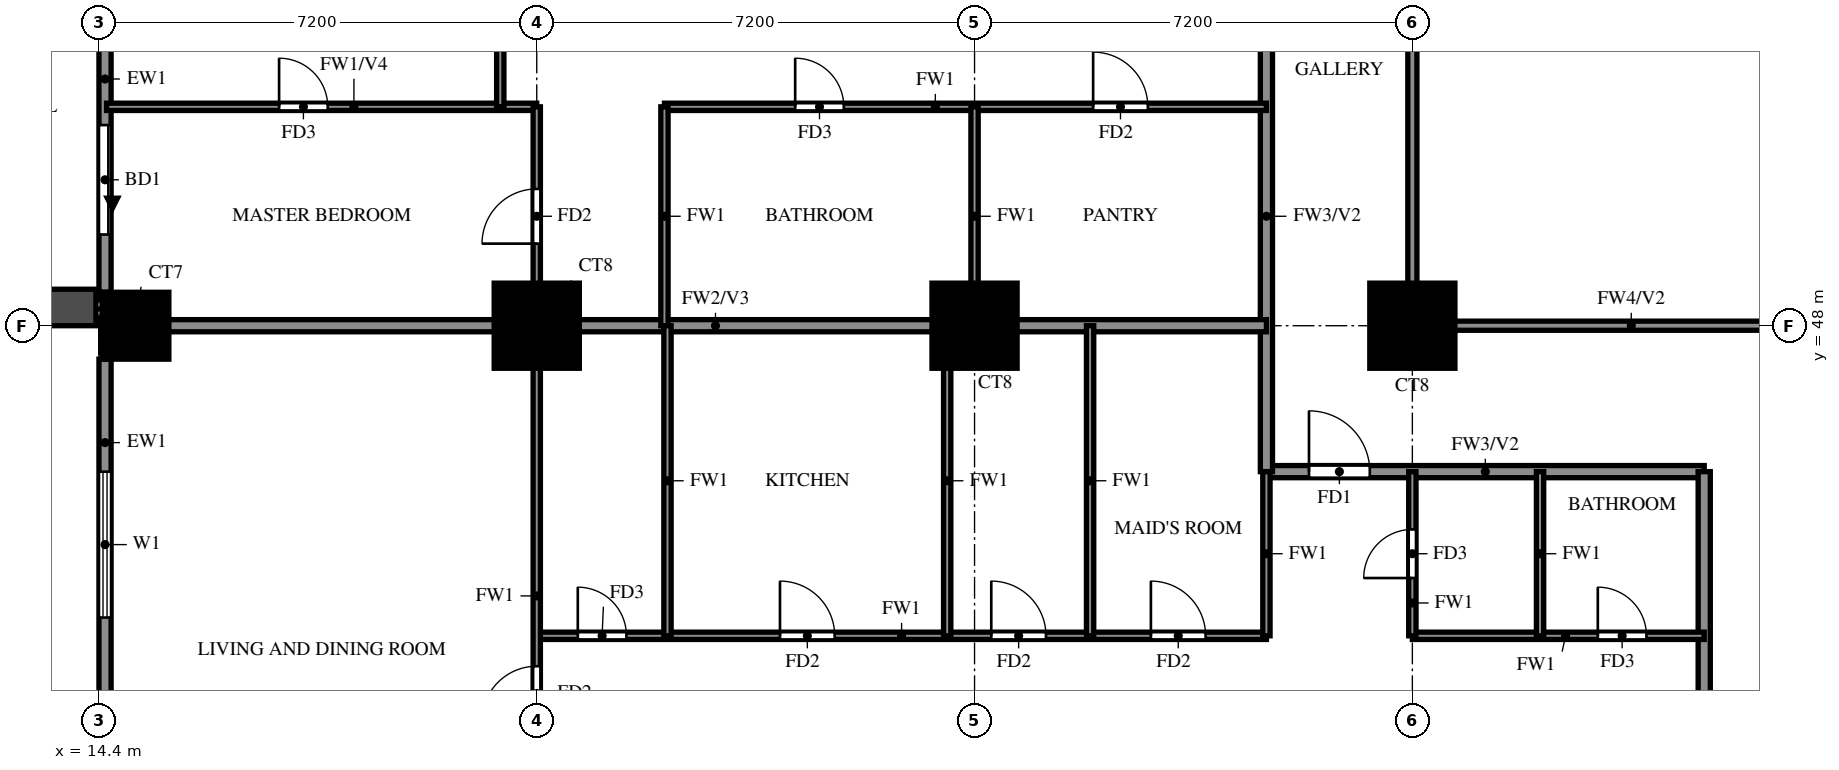
"""IFC4 building model, lengths in metres.
Left out: names, types, materials, properties, quantities, classifications, styles, units other than length and angle.
Written with IfcOpenShell. Run it as: python <this file> out.ifc"""

import sys

from ifc_helpers import new_model, si_unit, direction, frame, frame_2d, origin, origin_2d, place, context, subcontext, project, spatial, rectangle, extrude, source, transform, mapped, element, fill, save


model = new_model("IFC4")
c1 = context("Model", 3, precision=1e-05, world=origin(), true_north=direction((0.0, 1.0)))
c2 = subcontext(c1, "Body", "Model", "MODEL_VIEW")
j1 = project(units=[si_unit("LENGTHUNIT", "METRE"), si_unit("PLANEANGLEUNIT", "RADIAN")], contexts=[c1])
p1 = place(None, origin())
s1 = spatial("IfcSite", under=j1, at=p1, CompositionType="ELEMENT")
p2 = place(p1, origin())
s2 = spatial("IfcBuilding", under=s1, at=p2, CompositionType="ELEMENT")
p3 = place(p2, frame((0.0, 0.0, 58.5)))
s3 = spatial("IfcBuildingStorey", under=s2, at=p3, CompositionType="ELEMENT", Elevation=58.5)
m1 = source(origin(), c2, "Body", "SweptSolid", [
    extrude(rectangle(XDim=1.1, YDim=1.1, at=origin_2d()), origin(), (0.0, 0.0, 1.0), 3.18),
])
p4 = place(p3, frame((15.0, 48.0, 0.0), z_axis=(0.0, 0.0, 1.0), x_axis=(1.0, 0.0, 0.0)))
e1 = element("IfcColumn", 1, at=p4, inside=s3, PredefinedType="COLUMN", context=c2, shape_type="MappedRepresentation", body=[
    mapped(m1, transform((0.0, 0.0, 0.0))),
])
m2 = source(origin(), c2, "Body", "SweptSolid", [
    extrude(rectangle(XDim=1.4, YDim=1.4, at=origin_2d()), origin(), (0.0, 0.0, 1.0), 3.18),
])
for number, where, z_axis, x_axis in (
    (2, (21.6, 48.0, 0.0), (0.0, 0.0, 1.0), (1.0, 0.0, 0.0)),
    (3, (28.8, 48.0, 0.0), (0.0, 0.0, 1.0), (1.0, 0.0, 0.0)),
    (4, (36.0, 48.0, 0.0), (0.0, 0.0, 1.0), (1.0, 0.0, 0.0)),
):
    element("IfcColumn", number, at=place(p3, frame(where, z_axis=z_axis, x_axis=x_axis)), inside=s3, PredefinedType="COLUMN", context=c2, shape_type="MappedRepresentation", body=[
        mapped(m2, transform((0.0, 0.0, 0.0))),
    ])
p5 = place(p3, frame((14.5, 54.65, 0.0), z_axis=(0.0, 0.0, 1.0), x_axis=(0.0, -1.0, 0.0)))
e5 = element("IfcWall", 5, at=p5, inside=s3, PredefinedType="SOLIDWALL", context=c2, shape_type="SweptSolid", body=[
    extrude(rectangle(XDim=6.1, YDim=0.2, at=frame_2d((3.05, 0.0))), origin(), (0.0, 0.0, 1.0), 3.18),
])
p6 = place(p5, frame((3.35, 0.0, 0.0)))
e6 = element("IfcOpeningElement", 6, at=p6, cuts=e5, PredefinedType="OPENING", context=c2, shape_type="SweptSolid", body=[
    extrude(rectangle(XDim=1.8, YDim=2.4, at=frame_2d((0.9, 1.2))), frame((0.0, 0.11, 0.0), z_axis=(0.0, -1.0, 0.0), x_axis=(1.0, 0.0, 0.0)), (0.0, 0.0, 1.0), 0.22),
])
p7 = place(p5, frame((1.175, 0.0, 1.5)))
e7 = element("IfcOpeningElement", 7, at=p7, cuts=e5, PredefinedType="OPENING", context=c2, shape_type="SweptSolid", body=[
    extrude(rectangle(XDim=0.9, YDim=0.9, at=frame_2d((0.45, 0.45))), frame((0.0, 0.11, 0.0), z_axis=(0.0, -1.0, 0.0), x_axis=(1.0, 0.0, 0.0)), (0.0, 0.0, 1.0), 0.22),
])
p8 = place(p3, frame((14.5, 47.45, 0.0), z_axis=(0.0, 0.0, 1.0), x_axis=(0.0, -1.0, 0.0)))
e8 = element("IfcWall", 8, at=p8, inside=s3, PredefinedType="SOLIDWALL", context=c2, shape_type="SweptSolid", body=[
    extrude(rectangle(XDim=6.1, YDim=0.2, at=frame_2d((3.05, 0.0))), origin(), (0.0, 0.0, 1.0), 3.18),
])
p9 = place(p8, frame((1.85, 0.0, 0.6)))
e9 = element("IfcOpeningElement", 9, at=p9, cuts=e8, PredefinedType="OPENING", context=c2, shape_type="SweptSolid", body=[
    extrude(rectangle(XDim=2.4, YDim=2.4, at=frame_2d((1.2, 1.2))), frame((0.0, 0.11, 0.0), z_axis=(0.0, -1.0, 0.0), x_axis=(1.0, 0.0, 0.0)), (0.0, 0.0, 1.0), 0.22),
])
p10 = place(p3, frame((14.35, 48.3, 0.0), z_axis=(0.0, 0.0, 1.0), x_axis=(-1.0, 0.0, 0.0)))
e10 = element("IfcWall", 10, at=p10, inside=s3, PredefinedType="SOLIDWALL", context=c2, shape_type="SweptSolid", body=[
    extrude(rectangle(XDim=2.65, YDim=0.6, at=frame_2d((1.325, 0.0))), origin(), (0.0, 0.0, 1.0), 2.85),
])
p11 = place(p3, frame((33.6, 45.6, 0.0), z_axis=(0.0, 0.0, 1.0), x_axis=(1.0, 0.0, 0.0)))
e11 = element("IfcWall", 11, at=p11, inside=s3, PredefinedType="SOLIDWALL", context=c2, shape_type="SweptSolid", body=[
    extrude(rectangle(XDim=7.2, YDim=0.2, at=frame_2d((3.6, 0.0))), origin(), (0.0, 0.0, 1.0), 3.18),
])
p12 = place(p11, frame((0.7, 0.0, 0.0)))
e12 = element("IfcOpeningElement", 12, at=p12, cuts=e11, PredefinedType="OPENING", context=c2, shape_type="SweptSolid", body=[
    extrude(rectangle(XDim=1.0, YDim=2.1, at=frame_2d((0.5, 1.05))), frame((0.0, 0.11, 0.0), z_axis=(0.0, -1.0, 0.0), x_axis=(1.0, 0.0, 0.0)), (0.0, 0.0, 1.0), 0.22),
])
p13 = place(p3, frame((33.6, 45.6, 0.0), z_axis=(0.0, 0.0, 1.0), x_axis=(0.0, 1.0, 0.0)))
e13 = element("IfcWall", 13, at=p13, inside=s3, PredefinedType="SOLIDWALL", context=c2, shape_type="SweptSolid", body=[
    extrude(rectangle(XDim=8.4, YDim=0.2, at=frame_2d((4.2, 0.0))), origin(), (0.0, 0.0, 1.0), 3.18),
])
p14 = place(p3, frame((40.8, 33.725, 0.0), z_axis=(0.0, 0.0, 1.0), x_axis=(0.0, 1.0, 0.0)))
e14 = element("IfcWall", 14, at=p14, inside=s3, PredefinedType="SOLIDWALL", context=c2, shape_type="SweptSolid", body=[
    extrude(rectangle(XDim=11.875, YDim=0.2, at=frame_2d((5.938, 0.0))), origin(), (0.0, 0.0, 1.0), 2.28),
])
p15 = place(p3, frame((14.525, 48.0, 0.0), z_axis=(0.0, 0.0, 1.0), x_axis=(1.0, 0.0, 0.0)))
e15 = element("IfcWall", 15, at=p15, inside=s3, PredefinedType="SOLIDWALL", context=c2, shape_type="SweptSolid", body=[
    extrude(rectangle(XDim=19.075, YDim=0.2, at=frame_2d((9.538, 0.0))), origin(), (0.0, 0.0, 1.0), 3.18),
])
p16 = place(p3, frame((21.6, 42.9, 0.0), z_axis=(0.0, 0.0, 1.0), x_axis=(1.0, 0.0, 0.0)))
e16 = element("IfcWall", 16, at=p16, inside=s3, PredefinedType="PARTITIONING", context=c2, shape_type="SweptSolid", body=[
    extrude(rectangle(XDim=12.0, YDim=0.12, at=frame_2d((6.0, 0.0))), origin(), (0.0, 0.0, 1.0), 3.18),
])
p17 = place(p16, frame((0.675, 0.0, 0.0)))
e17 = element("IfcOpeningElement", 17, at=p17, cuts=e16, PredefinedType="OPENING", context=c2, shape_type="SweptSolid", body=[
    extrude(rectangle(XDim=0.8, YDim=2.1, at=frame_2d((0.4, 1.05))), frame((0.0, 0.07, 0.0), z_axis=(0.0, -1.0, 0.0), x_axis=(1.0, 0.0, 0.0)), (0.0, 0.0, 1.0), 0.14),
])
p18 = place(p16, frame((4.0, 0.0, 0.0)))
e18 = element("IfcOpeningElement", 18, at=p18, cuts=e16, PredefinedType="OPENING", context=c2, shape_type="SweptSolid", body=[
    extrude(rectangle(XDim=0.9, YDim=2.1, at=frame_2d((0.45, 1.05))), frame((0.0, 0.07, 0.0), z_axis=(0.0, -1.0, 0.0), x_axis=(1.0, 0.0, 0.0)), (0.0, 0.0, 1.0), 0.14),
])
p19 = place(p16, frame((7.475, 0.0, 0.0)))
e19 = element("IfcOpeningElement", 19, at=p19, cuts=e16, PredefinedType="OPENING", context=c2, shape_type="SweptSolid", body=[
    extrude(rectangle(XDim=0.9, YDim=2.1, at=frame_2d((0.45, 1.05))), frame((0.0, 0.07, 0.0), z_axis=(0.0, -1.0, 0.0), x_axis=(1.0, 0.0, 0.0)), (0.0, 0.0, 1.0), 0.14),
])
p20 = place(p16, frame((10.1, 0.0, 0.0)))
e20 = element("IfcOpeningElement", 20, at=p20, cuts=e16, PredefinedType="OPENING", context=c2, shape_type="SweptSolid", body=[
    extrude(rectangle(XDim=0.9, YDim=2.1, at=frame_2d((0.45, 1.05))), frame((0.0, 0.07, 0.0), z_axis=(0.0, -1.0, 0.0), x_axis=(1.0, 0.0, 0.0)), (0.0, 0.0, 1.0), 0.14),
])
p21 = place(p3, frame((36.0, 42.9, 0.0), z_axis=(0.0, 0.0, 1.0), x_axis=(1.0, 0.0, 0.0)))
e21 = element("IfcWall", 21, at=p21, inside=s3, PredefinedType="PARTITIONING", context=c2, shape_type="SweptSolid", body=[
    extrude(rectangle(XDim=4.8, YDim=0.12, at=frame_2d((2.4, 0.0))), origin(), (0.0, 0.0, 1.0), 3.18),
])
p22 = place(p21, frame((3.05, 0.0, 0.0)))
e22 = element("IfcOpeningElement", 22, at=p22, cuts=e21, PredefinedType="OPENING", context=c2, shape_type="SweptSolid", body=[
    extrude(rectangle(XDim=0.8, YDim=2.1, at=frame_2d((0.4, 1.05))), frame((0.0, 0.07, 0.0), z_axis=(0.0, -1.0, 0.0), x_axis=(1.0, 0.0, 0.0)), (0.0, 0.0, 1.0), 0.14),
])
p23 = place(p3, frame((14.525, 51.6, 0.0), z_axis=(0.0, 0.0, 1.0), x_axis=(1.0, 0.0, 0.0)))
e23 = element("IfcWall", 23, at=p23, inside=s3, PredefinedType="PARTITIONING", context=c2, shape_type="SweptSolid", body=[
    extrude(rectangle(XDim=7.075, YDim=0.12, at=frame_2d((3.538, 0.0))), origin(), (0.0, 0.0, 1.0), 2.28),
])
p24 = place(p23, frame((2.837, 0.0, 0.0)))
e24 = element("IfcOpeningElement", 24, at=p24, cuts=e23, PredefinedType="OPENING", context=c2, shape_type="SweptSolid", body=[
    extrude(rectangle(XDim=0.8, YDim=2.1, at=frame_2d((0.4, 1.05))), frame((0.0, 0.07, 0.0), z_axis=(0.0, -1.0, 0.0), x_axis=(1.0, 0.0, 0.0)), (0.0, 0.0, 1.0), 0.14),
])
p25 = place(p3, frame((23.7, 51.6, 0.0), z_axis=(0.0, 0.0, 1.0), x_axis=(1.0, 0.0, 0.0)))
e25 = element("IfcWall", 25, at=p25, inside=s3, PredefinedType="PARTITIONING", context=c2, shape_type="SweptSolid", body=[
    extrude(rectangle(XDim=9.9, YDim=0.12, at=frame_2d((4.95, 0.0))), origin(), (0.0, 0.0, 1.0), 3.18),
])
p26 = place(p25, frame((2.15, 0.0, 0.0)))
e26 = element("IfcOpeningElement", 26, at=p26, cuts=e25, PredefinedType="OPENING", context=c2, shape_type="SweptSolid", body=[
    extrude(rectangle(XDim=0.8, YDim=2.1, at=frame_2d((0.4, 1.05))), frame((0.0, 0.07, 0.0), z_axis=(0.0, -1.0, 0.0), x_axis=(1.0, 0.0, 0.0)), (0.0, 0.0, 1.0), 0.14),
])
p27 = place(p25, frame((7.05, 0.0, 0.0)))
e27 = element("IfcOpeningElement", 27, at=p27, cuts=e25, PredefinedType="OPENING", context=c2, shape_type="SweptSolid", body=[
    extrude(rectangle(XDim=0.9, YDim=2.1, at=frame_2d((0.45, 1.05))), frame((0.0, 0.07, 0.0), z_axis=(0.0, -1.0, 0.0), x_axis=(1.0, 0.0, 0.0)), (0.0, 0.0, 1.0), 0.14),
])
p28 = place(p3, frame((21.0, 51.6, 0.0), z_axis=(0.0, 0.0, 1.0), x_axis=(0.0, 1.0, 0.0)))
e28 = element("IfcWall", 28, at=p28, inside=s3, PredefinedType="PARTITIONING", context=c2, shape_type="SweptSolid", body=[
    extrude(rectangle(XDim=3.6, YDim=0.12, at=frame_2d((1.8, 0.0))), origin(), (0.0, 0.0, 1.0), 3.18),
])
p29 = place(p3, frame((21.6, 33.725, 0.0), z_axis=(0.0, 0.0, 1.0), x_axis=(0.0, 1.0, 0.0)))
e29 = element("IfcWall", 29, at=p29, inside=s3, PredefinedType="PARTITIONING", context=c2, shape_type="SweptSolid", body=[
    extrude(rectangle(XDim=17.875, YDim=0.12, at=frame_2d((8.938, 0.0))), origin(), (0.0, 0.0, 1.0), 3.18),
])
p30 = place(p29, frame((7.775, 0.0, 0.0)))
e30 = element("IfcOpeningElement", 30, at=p30, cuts=e29, PredefinedType="OPENING", context=c2, shape_type="SweptSolid", body=[
    extrude(rectangle(XDim=0.9, YDim=2.1, at=frame_2d((0.45, 1.05))), frame((0.0, 0.07, 0.0), z_axis=(0.0, -1.0, 0.0), x_axis=(1.0, 0.0, 0.0)), (0.0, 0.0, 1.0), 0.14),
])
p31 = place(p29, frame((15.625, 0.0, 0.0)))
e31 = element("IfcOpeningElement", 31, at=p31, cuts=e29, PredefinedType="OPENING", context=c2, shape_type="SweptSolid", body=[
    extrude(rectangle(XDim=0.9, YDim=2.1, at=frame_2d((0.45, 1.05))), frame((0.0, 0.07, 0.0), z_axis=(0.0, -1.0, 0.0), x_axis=(1.0, 0.0, 0.0)), (0.0, 0.0, 1.0), 0.14),
])
p32 = place(p3, frame((23.7, 48.0, 0.0), z_axis=(0.0, 0.0, 1.0), x_axis=(0.0, 1.0, 0.0)))
e32 = element("IfcWall", 32, at=p32, inside=s3, PredefinedType="PARTITIONING", context=c2, shape_type="SweptSolid", body=[
    extrude(rectangle(XDim=3.6, YDim=0.12, at=frame_2d((1.8, 0.0))), origin(), (0.0, 0.0, 1.0), 3.18),
])
for number, where, z_axis, x_axis in (
    (33, (23.75, 42.9, 0.0), (0.0, 0.0, 1.0), (0.0, 1.0, 0.0)),
    (34, (28.35, 42.9, 0.0), (0.0, 0.0, 1.0), (0.0, 1.0, 0.0)),
):
    element("IfcWall", number, at=place(p3, frame(where, z_axis=z_axis, x_axis=x_axis)), inside=s3, PredefinedType="PARTITIONING", context=c2, shape_type="SweptSolid", body=[
        extrude(rectangle(XDim=5.1, YDim=0.12, at=frame_2d((2.55, 0.0))), origin(), (0.0, 0.0, 1.0), 3.18),
    ])
p33 = place(p3, frame((28.8, 48.0, 0.0), z_axis=(0.0, 0.0, 1.0), x_axis=(0.0, 1.0, 0.0)))
e35 = element("IfcWall", 35, at=p33, inside=s3, PredefinedType="PARTITIONING", context=c2, shape_type="SweptSolid", body=[
    extrude(rectangle(XDim=3.6, YDim=0.12, at=frame_2d((1.8, 0.0))), origin(), (0.0, 0.0, 1.0), 3.18),
])
p34 = place(p3, frame((30.7, 42.9, 0.0), z_axis=(0.0, 0.0, 1.0), x_axis=(0.0, 1.0, 0.0)))
e36 = element("IfcWall", 36, at=p34, inside=s3, PredefinedType="PARTITIONING", context=c2, shape_type="SweptSolid", body=[
    extrude(rectangle(XDim=5.1, YDim=0.12, at=frame_2d((2.55, 0.0))), origin(), (0.0, 0.0, 1.0), 3.18),
])
p35 = place(p3, frame((33.6, 42.9, 0.0), z_axis=(0.0, 0.0, 1.0), x_axis=(0.0, 1.0, 0.0)))
e37 = element("IfcWall", 37, at=p35, inside=s3, PredefinedType="PARTITIONING", context=c2, shape_type="SweptSolid", body=[
    extrude(rectangle(XDim=2.7, YDim=0.12, at=frame_2d((1.35, 0.0))), origin(), (0.0, 0.0, 1.0), 3.18),
])
p36 = place(p3, frame((36.0, 42.9, 0.0), z_axis=(0.0, 0.0, 1.0), x_axis=(0.0, 1.0, 0.0)))
e38 = element("IfcWall", 38, at=p36, inside=s3, PredefinedType="PARTITIONING", context=c2, shape_type="SweptSolid", body=[
    extrude(rectangle(XDim=2.7, YDim=0.12, at=frame_2d((1.35, 0.0))), origin(), (0.0, 0.0, 1.0), 3.18),
])
p37 = place(p36, frame((0.95, 0.0, 0.0)))
e39 = element("IfcOpeningElement", 39, at=p37, cuts=e38, PredefinedType="OPENING", context=c2, shape_type="SweptSolid", body=[
    extrude(rectangle(XDim=0.8, YDim=2.1, at=frame_2d((0.4, 1.05))), frame((0.0, 0.07, 0.0), z_axis=(0.0, -1.0, 0.0), x_axis=(1.0, 0.0, 0.0)), (0.0, 0.0, 1.0), 0.14),
])
p38 = place(p3, frame((38.1, 42.9, 0.0), z_axis=(0.0, 0.0, 1.0), x_axis=(0.0, 1.0, 0.0)))
e40 = element("IfcWall", 40, at=p38, inside=s3, PredefinedType="PARTITIONING", context=c2, shape_type="SweptSolid", body=[
    extrude(rectangle(XDim=2.7, YDim=0.12, at=frame_2d((1.35, 0.0))), origin(), (0.0, 0.0, 1.0), 3.18),
])
p39 = place(p3, frame((36.0, 48.0, 0.0), z_axis=(0.0, 0.0, 1.0), x_axis=(1.0, 0.0, 0.0)))
e41 = element("IfcWall", 41, at=p39, inside=s3, PredefinedType="SOLIDWALL", context=c2, shape_type="SweptSolid", body=[
    extrude(rectangle(XDim=7.2, YDim=0.15, at=frame_2d((3.6, 0.0))), origin(), (0.0, 0.0, 1.0), 2.28),
])
p40 = place(p3, frame((36.0, 48.0, 0.0), z_axis=(0.0, 0.0, 1.0), x_axis=(0.0, 1.0, 0.0)))
e42 = element("IfcWall", 42, at=p40, inside=s3, PredefinedType="SOLIDWALL", context=c2, shape_type="SweptSolid", body=[
    extrude(rectangle(XDim=14.4, YDim=0.15, at=frame_2d((7.2, 0.0))), origin(), (0.0, 0.0, 1.0), 2.28),
])
p41 = place(p6, origin())
e43 = element("IfcDoor", 43, at=p41, inside=s3, OperationType="DOUBLE_DOOR_SLIDING", PredefinedType="DOOR", context=c2, shape_type="SweptSolid", body=[
    extrude(rectangle(XDim=1.8, YDim=2.4, at=frame_2d((0.9, 1.2))), frame((0.0, 0.025, 0.0), z_axis=(0.0, -1.0, 0.0), x_axis=(1.0, 0.0, 0.0)), (0.0, 0.0, 1.0), 0.05),
])
fill(e6, e43)
p42 = place(p9, origin())
e44 = element("IfcWindow", 44, at=p42, inside=s3, PartitioningType="DOUBLE_PANEL_VERTICAL", PredefinedType="WINDOW", context=c2, shape_type="SweptSolid", body=[
    extrude(rectangle(XDim=2.4, YDim=2.4, at=frame_2d((1.2, 1.2))), frame((0.0, 0.03, 0.0), z_axis=(0.0, -1.0, 0.0), x_axis=(1.0, 0.0, 0.0)), (0.0, 0.0, 1.0), 0.06),
])
fill(e9, e44)
p43 = place(p12, origin())
e45 = element("IfcDoor", 45, at=p43, inside=s3, OperationType="SINGLE_SWING_LEFT", PredefinedType="DOOR", context=c2, shape_type="SweptSolid", body=[
    extrude(rectangle(XDim=1.0, YDim=2.1, at=frame_2d((0.5, 1.05))), frame((0.0, 0.025, 0.0), z_axis=(0.0, -1.0, 0.0), x_axis=(1.0, 0.0, 0.0)), (0.0, 0.0, 1.0), 0.05),
])
fill(e12, e45)
p44 = place(p30, origin())
e46 = element("IfcDoor", 46, at=p44, inside=s3, OperationType="SINGLE_SWING_LEFT", PredefinedType="DOOR", context=c2, shape_type="SweptSolid", body=[
    extrude(rectangle(XDim=0.9, YDim=2.1, at=frame_2d((0.45, 1.05))), frame((0.0, 0.025, 0.0), z_axis=(0.0, -1.0, 0.0), x_axis=(1.0, 0.0, 0.0)), (0.0, 0.0, 1.0), 0.05),
])
fill(e30, e46)
p45 = place(p17, origin())
e47 = element("IfcDoor", 47, at=p45, inside=s3, OperationType="SINGLE_SWING_RIGHT", PredefinedType="DOOR", context=c2, shape_type="SweptSolid", body=[
    extrude(rectangle(XDim=0.8, YDim=2.1, at=frame_2d((0.4, 1.05))), frame((0.0, 0.025, 0.0), z_axis=(0.0, -1.0, 0.0), x_axis=(1.0, 0.0, 0.0)), (0.0, 0.0, 1.0), 0.05),
])
fill(e17, e47)
p46 = place(p18, origin())
e48 = element("IfcDoor", 48, at=p46, inside=s3, OperationType="SINGLE_SWING_LEFT", PredefinedType="DOOR", context=c2, shape_type="SweptSolid", body=[
    extrude(rectangle(XDim=0.9, YDim=2.1, at=frame_2d((0.45, 1.05))), frame((0.0, 0.025, 0.0), z_axis=(0.0, -1.0, 0.0), x_axis=(1.0, 0.0, 0.0)), (0.0, 0.0, 1.0), 0.05),
])
fill(e18, e48)
p47 = place(p19, origin())
e49 = element("IfcDoor", 49, at=p47, inside=s3, OperationType="SINGLE_SWING_LEFT", PredefinedType="DOOR", context=c2, shape_type="SweptSolid", body=[
    extrude(rectangle(XDim=0.9, YDim=2.1, at=frame_2d((0.45, 1.05))), frame((0.0, 0.025, 0.0), z_axis=(0.0, -1.0, 0.0), x_axis=(1.0, 0.0, 0.0)), (0.0, 0.0, 1.0), 0.05),
])
fill(e19, e49)
p48 = place(p20, origin())
e50 = element("IfcDoor", 50, at=p48, inside=s3, OperationType="SINGLE_SWING_RIGHT", PredefinedType="DOOR", context=c2, shape_type="SweptSolid", body=[
    extrude(rectangle(XDim=0.9, YDim=2.1, at=frame_2d((0.45, 1.05))), frame((0.0, 0.025, 0.0), z_axis=(0.0, -1.0, 0.0), x_axis=(1.0, 0.0, 0.0)), (0.0, 0.0, 1.0), 0.05),
])
fill(e20, e50)
p49 = place(p37, origin())
e51 = element("IfcDoor", 51, at=p49, inside=s3, OperationType="SINGLE_SWING_LEFT", PredefinedType="DOOR", context=c2, shape_type="SweptSolid", body=[
    extrude(rectangle(XDim=0.8, YDim=2.1, at=frame_2d((0.4, 1.05))), frame((0.0, 0.025, 0.0), z_axis=(0.0, -1.0, 0.0), x_axis=(1.0, 0.0, 0.0)), (0.0, 0.0, 1.0), 0.05),
])
fill(e39, e51)
p50 = place(p22, origin())
e52 = element("IfcDoor", 52, at=p50, inside=s3, OperationType="SINGLE_SWING_LEFT", PredefinedType="DOOR", context=c2, shape_type="SweptSolid", body=[
    extrude(rectangle(XDim=0.8, YDim=2.1, at=frame_2d((0.4, 1.05))), frame((0.0, 0.025, 0.0), z_axis=(0.0, -1.0, 0.0), x_axis=(1.0, 0.0, 0.0)), (0.0, 0.0, 1.0), 0.05),
])
fill(e22, e52)
p51 = place(p31, origin())
e53 = element("IfcDoor", 53, at=p51, inside=s3, OperationType="SINGLE_SWING_LEFT", PredefinedType="DOOR", context=c2, shape_type="SweptSolid", body=[
    extrude(rectangle(XDim=0.9, YDim=2.1, at=frame_2d((0.45, 1.05))), frame((0.0, 0.025, 0.0), z_axis=(0.0, -1.0, 0.0), x_axis=(1.0, 0.0, 0.0)), (0.0, 0.0, 1.0), 0.05),
])
fill(e31, e53)
p52 = place(p24, origin())
e54 = element("IfcDoor", 54, at=p52, inside=s3, OperationType="SINGLE_SWING_LEFT", PredefinedType="DOOR", context=c2, shape_type="SweptSolid", body=[
    extrude(rectangle(XDim=0.8, YDim=2.1, at=frame_2d((0.4, 1.05))), frame((0.0, 0.025, 0.0), z_axis=(0.0, -1.0, 0.0), x_axis=(1.0, 0.0, 0.0)), (0.0, 0.0, 1.0), 0.05),
])
fill(e24, e54)
p53 = place(p26, origin())
e55 = element("IfcDoor", 55, at=p53, inside=s3, OperationType="SINGLE_SWING_LEFT", PredefinedType="DOOR", context=c2, shape_type="SweptSolid", body=[
    extrude(rectangle(XDim=0.8, YDim=2.1, at=frame_2d((0.4, 1.05))), frame((0.0, 0.025, 0.0), z_axis=(0.0, -1.0, 0.0), x_axis=(1.0, 0.0, 0.0)), (0.0, 0.0, 1.0), 0.05),
])
fill(e26, e55)
p54 = place(p27, origin())
e56 = element("IfcDoor", 56, at=p54, inside=s3, OperationType="SINGLE_SWING_RIGHT", PredefinedType="DOOR", context=c2, shape_type="SweptSolid", body=[
    extrude(rectangle(XDim=0.9, YDim=2.1, at=frame_2d((0.45, 1.05))), frame((0.0, 0.025, 0.0), z_axis=(0.0, -1.0, 0.0), x_axis=(1.0, 0.0, 0.0)), (0.0, 0.0, 1.0), 0.05),
])
fill(e27, e56)
save(model, sys.argv[1])
